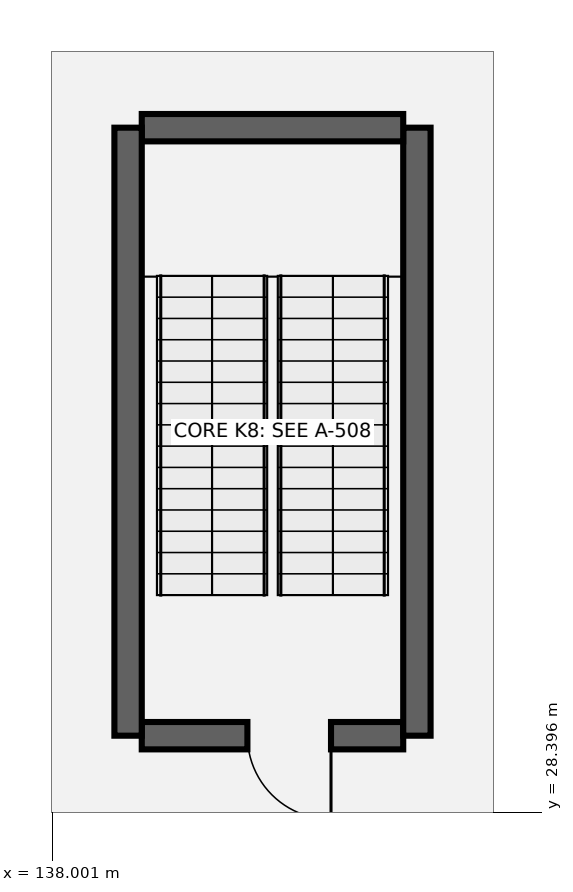
"""IFC4 building model, lengths in metres.
Left out: names, types, materials, properties, quantities, classifications, styles, units other than length and angle.
Written with IfcOpenShell. Run it as: python <this file> out.ifc"""

import sys

from ifc_helpers import new_model, si_unit, direction, frame, frame_2d, origin, place, context, subcontext, project, spatial, rectangle, extrude, element, fill, save


model = new_model("IFC4")
c1 = context("Model", 3, precision=1e-05, world=origin(), true_north=direction((0.0, 1.0)))
c2 = subcontext(c1, "Body", "Model", "MODEL_VIEW")
j1 = project(units=[si_unit("LENGTHUNIT", "METRE"), si_unit("PLANEANGLEUNIT", "RADIAN")], contexts=[c1])
p1 = place(None, origin())
s1 = spatial("IfcSite", under=j1, at=p1, CompositionType="ELEMENT")
p2 = place(p1, origin())
s2 = spatial("IfcBuilding", under=s1, at=p2, CompositionType="ELEMENT")
p3 = place(p2, origin())
s3 = spatial("IfcBuildingStorey", under=s2, at=p3, CompositionType="ELEMENT", Elevation=0.0)
p4 = place(p3, frame((142.62, 29.4, 0.0), z_axis=(0.0, 0.0, 1.0), x_axis=(-1.0, 0.0, 0.0)))
e1 = element("IfcWall", 1, at=p4, inside=s3, PredefinedType="SHEAR", context=c2, shape_type="SweptSolid", body=[
    extrude(rectangle(XDim=3.44, YDim=0.36, at=frame_2d((1.72, 0.0))), origin(), (0.0, 0.0, 1.0), 5.12),
])
p5 = place(p4, frame((0.95, 0.0, 0.0)))
e2 = element("IfcOpeningElement", 2, at=p5, cuts=e1, PredefinedType="OPENING", context=c2, shape_type="SweptSolid", body=[
    extrude(rectangle(XDim=1.1, YDim=2.15, at=frame_2d((0.55, 1.075))), frame((0.0, 0.19, 0.0), z_axis=(0.0, -1.0, 0.0), x_axis=(1.0, 0.0, 0.0)), (0.0, 0.0, 1.0), 0.38),
])
p6 = place(p3, frame((142.8, 29.4, 0.0), z_axis=(0.0, 0.0, 1.0), x_axis=(0.0, 1.0, 0.0)))
e3 = element("IfcWall", 3, at=p6, inside=s3, PredefinedType="SHEAR", context=c2, shape_type="SweptSolid", body=[
    extrude(rectangle(XDim=8.0, YDim=0.36, at=frame_2d((4.0, 0.0))), origin(), (0.0, 0.0, 1.0), 5.12),
])
p7 = place(p3, frame((142.62, 37.4, 0.0), z_axis=(0.0, 0.0, 1.0), x_axis=(-1.0, 0.0, 0.0)))
e4 = element("IfcWall", 4, at=p7, inside=s3, PredefinedType="SHEAR", context=c2, shape_type="SweptSolid", body=[
    extrude(rectangle(XDim=3.44, YDim=0.36, at=frame_2d((1.72, 0.0))), origin(), (0.0, 0.0, 1.0), 5.12),
])
p8 = place(p3, frame((139.0, 37.4, 0.0), z_axis=(0.0, 0.0, 1.0), x_axis=(0.0, -1.0, 0.0)))
e5 = element("IfcWall", 5, at=p8, inside=s3, PredefinedType="SHEAR", context=c2, shape_type="SweptSolid", body=[
    extrude(rectangle(XDim=8.0, YDim=0.36, at=frame_2d((4.0, 0.0))), origin(), (0.0, 0.0, 1.0), 5.12),
])
p9 = place(p5, origin())
e6 = element("IfcDoor", 6, at=p9, inside=s3, OperationType="SINGLE_SWING_LEFT", PredefinedType="DOOR", context=c2, shape_type="SweptSolid", body=[
    extrude(rectangle(XDim=1.1, YDim=2.15, at=frame_2d((0.55, 1.075))), frame((0.0, 0.025, 0.0), z_axis=(0.0, -1.0, 0.0), x_axis=(1.0, 0.0, 0.0)), (0.0, 0.0, 1.0), 0.05),
])
fill(e2, e6)
save(model, sys.argv[1])
